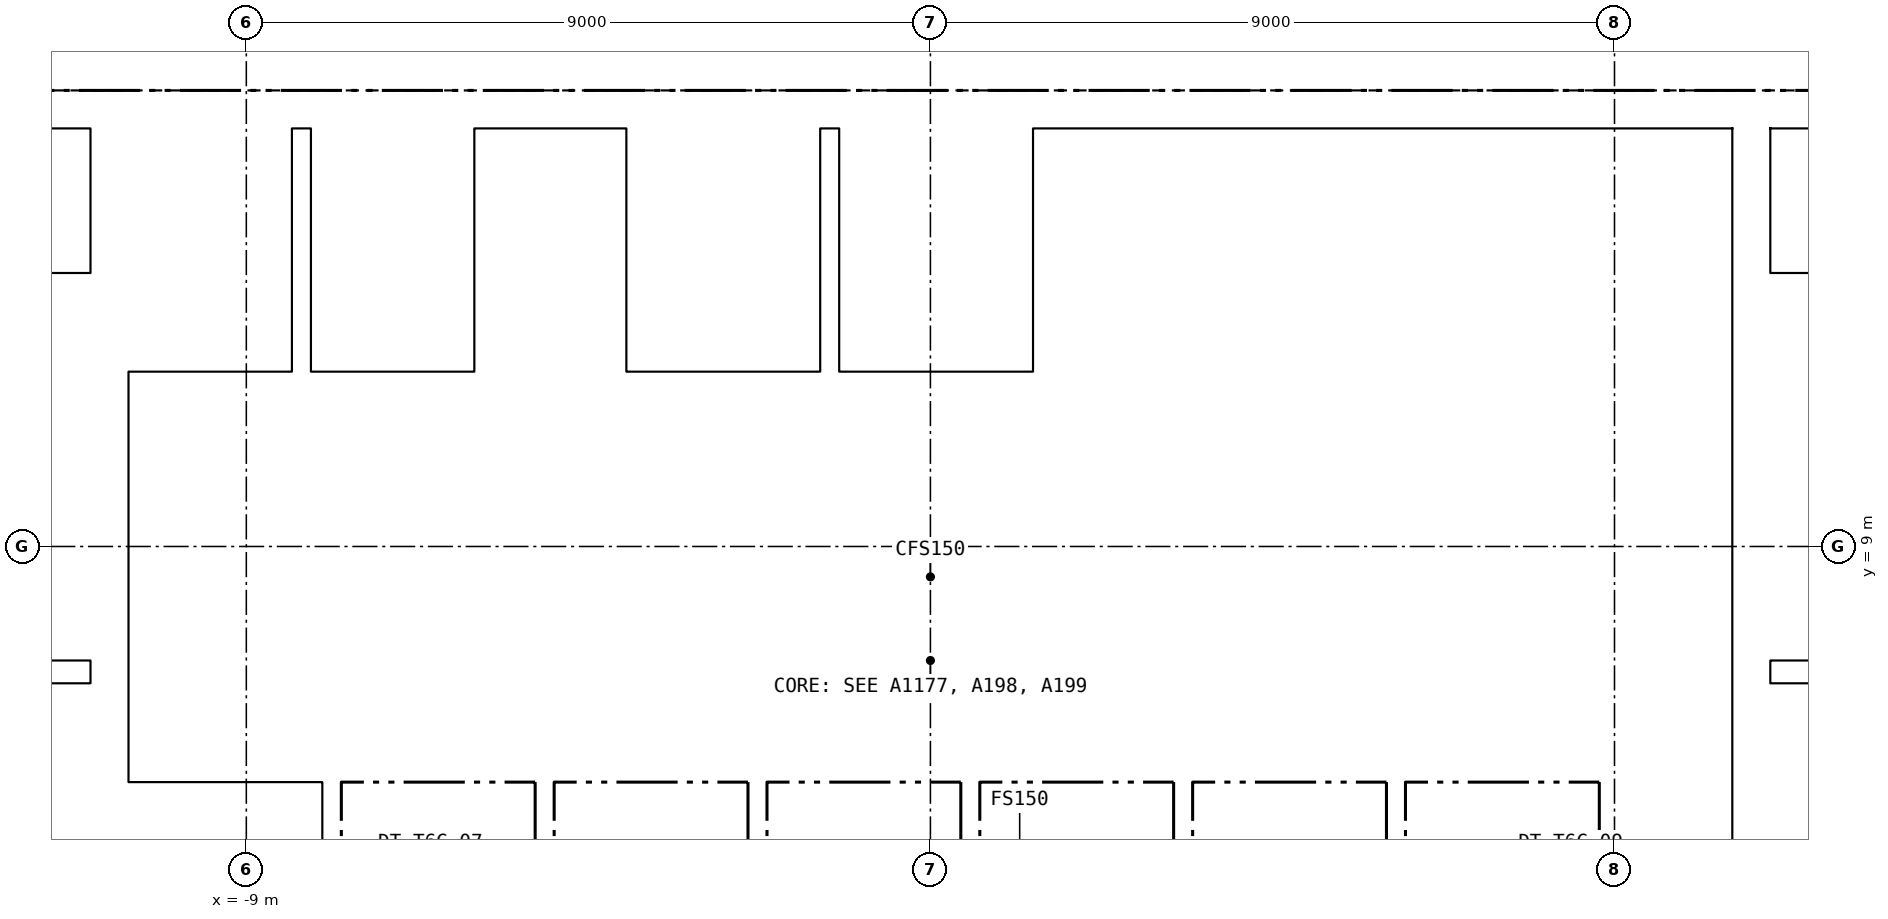
"""IFC4 building model, lengths in metres.
Left out: names, types, materials, properties, quantities, classifications, styles, units other than length and angle.
Written with IfcOpenShell. Run it as: python <this file> out.ifc"""

import sys

from ifc_helpers import new_model, si_unit, direction, frame, frame_2d, origin, place, context, subcontext, project, spatial, rectangle, extrude, element, fill, save


model = new_model("IFC4")
c1 = context("Model", 3, precision=1e-05, world=origin(), true_north=direction((0.0, 1.0)))
c2 = subcontext(c1, "Body", "Model", "MODEL_VIEW")
j1 = project(units=[si_unit("LENGTHUNIT", "METRE"), si_unit("PLANEANGLEUNIT", "RADIAN")], contexts=[c1])
p1 = place(None, origin())
s1 = spatial("IfcSite", under=j1, at=p1, CompositionType="ELEMENT")
p2 = place(p1, origin())
s2 = spatial("IfcBuilding", under=s1, at=p2, CompositionType="ELEMENT")
p3 = place(p2, frame((0.0, 0.0, 282.85)))
s3 = spatial("IfcBuildingStorey", under=s2, at=p3, CompositionType="ELEMENT", Elevation=282.85)
p4 = place(p3, frame((-15.0, 14.75, -0.15), z_axis=(0.0, 0.0, 1.0), x_axis=(1.0, 0.0, 0.0)))
e1 = element("IfcWall", 1, at=p4, inside=s3, PredefinedType="SOLIDWALL", context=c2, shape_type="SweptSolid", body=[
    extrude(rectangle(XDim=30.0, YDim=0.5, at=frame_2d((15.0, 0.0))), origin(), (0.0, 0.0, 1.0), 3.65),
])
p5 = place(p4, frame((9.25, 0.0, 0.15)))
e2 = element("IfcOpeningElement", 2, at=p5, cuts=e1, PredefinedType="OPENING", context=c2, shape_type="SweptSolid", body=[
    extrude(rectangle(XDim=1.5, YDim=2.1, at=frame_2d((0.75, 1.05))), frame((0.0, 0.26, 0.0), z_axis=(0.0, -1.0, 0.0), x_axis=(1.0, 0.0, 0.0)), (0.0, 0.0, 1.0), 0.52),
])
p6 = place(p4, frame((19.4, 0.0, 0.15)))
e3 = element("IfcOpeningElement", 3, at=p6, cuts=e1, PredefinedType="OPENING", context=c2, shape_type="SweptSolid", body=[
    extrude(rectangle(XDim=1.5, YDim=2.1, at=frame_2d((0.75, 1.05))), frame((0.0, 0.26, 0.0), z_axis=(0.0, -1.0, 0.0), x_axis=(1.0, 0.0, 0.0)), (0.0, 0.0, 1.0), 0.52),
])
p7 = place(p4, frame((1.5, 0.0, 0.15)))
e4 = element("IfcOpeningElement", 4, at=p7, cuts=e1, PredefinedType="OPENING", context=c2, shape_type="SweptSolid", body=[
    extrude(rectangle(XDim=1.2, YDim=2.1, at=frame_2d((0.6, 1.05))), frame((0.0, 0.26, 0.0), z_axis=(0.0, -1.0, 0.0), x_axis=(1.0, 0.0, 0.0)), (0.0, 0.0, 1.0), 0.52),
])
p8 = place(p4, frame((27.3, 0.0, 0.15)))
e5 = element("IfcOpeningElement", 5, at=p8, cuts=e1, PredefinedType="OPENING", context=c2, shape_type="SweptSolid", body=[
    extrude(rectangle(XDim=1.2, YDim=2.1, at=frame_2d((0.6, 1.05))), frame((0.0, 0.26, 0.0), z_axis=(0.0, -1.0, 0.0), x_axis=(1.0, 0.0, 0.0)), (0.0, 0.0, 1.0), 0.52),
])
for number, where, z_axis, x_axis in (
    (6, (-10.8, 0.5, -0.15), (0.0, 0.0, 1.0), (0.0, 1.0, 0.0)),
    (7, (10.8, 0.5, -0.15), (0.0, 0.0, 1.0), (0.0, 1.0, 0.0)),
):
    element("IfcWall", number, at=place(p3, frame(where, z_axis=z_axis, x_axis=x_axis)), inside=s3, PredefinedType="SOLIDWALL", context=c2, shape_type="SweptSolid", body=[
        extrude(rectangle(XDim=14.0, YDim=0.5, at=frame_2d((7.0, 0.0))), origin(), (0.0, 0.0, 1.0), 3.65),
    ])
p9 = place(p3, frame((-10.55, 6.025, 0.0), z_axis=(0.0, 0.0, 1.0), x_axis=(1.0, 0.0, 0.0)))
e8 = element("IfcWall", 8, at=p9, inside=s3, PredefinedType="PARTITIONING", context=c2, shape_type="SweptSolid", body=[
    extrude(rectangle(XDim=21.1, YDim=0.25, at=frame_2d((10.55, 0.0))), origin(), (0.0, 0.0, 1.0), 3.5),
])
p10 = place(p3, frame((-4.125, 8.55, 0.0), z_axis=(0.0, 0.0, 1.0), x_axis=(1.0, 0.0, 0.0)))
e9 = element("IfcWall", 9, at=p10, inside=s3, PredefinedType="PARTITIONING", context=c2, shape_type="SweptSolid", body=[
    extrude(rectangle(XDim=14.675, YDim=0.2, at=frame_2d((7.337, 0.0))), origin(), (0.0, 0.0, 1.0), 3.5),
])
p11 = place(p10, frame((1.413, 0.0, 0.0)))
e10 = element("IfcOpeningElement", 10, at=p11, cuts=e9, PredefinedType="OPENING", context=c2, shape_type="SweptSolid", body=[
    extrude(rectangle(XDim=1.0, YDim=2.1, at=frame_2d((0.5, 1.05))), frame((0.0, 0.11, 0.0), z_axis=(0.0, -1.0, 0.0), x_axis=(1.0, 0.0, 0.0)), (0.0, 0.0, 1.0), 0.22),
])
p12 = place(p10, frame((5.0, 0.0, 0.0)))
e11 = element("IfcOpeningElement", 11, at=p12, cuts=e9, PredefinedType="OPENING", context=c2, shape_type="SweptSolid", body=[
    extrude(rectangle(XDim=1.0, YDim=2.1, at=frame_2d((0.5, 1.05))), frame((0.0, 0.11, 0.0), z_axis=(0.0, -1.0, 0.0), x_axis=(1.0, 0.0, 0.0)), (0.0, 0.0, 1.0), 0.22),
])
p13 = place(p10, frame((9.613, 0.0, 0.0)))
e12 = element("IfcOpeningElement", 12, at=p13, cuts=e9, PredefinedType="OPENING", context=c2, shape_type="SweptSolid", body=[
    extrude(rectangle(XDim=1.0, YDim=2.1, at=frame_2d((0.5, 1.05))), frame((0.0, 0.11, 0.0), z_axis=(0.0, -1.0, 0.0), x_axis=(1.0, 0.0, 0.0)), (0.0, 0.0, 1.0), 0.22),
])
p14 = place(p10, frame((13.475, 0.0, 0.0)))
e13 = element("IfcOpeningElement", 13, at=p14, cuts=e9, PredefinedType="OPENING", context=c2, shape_type="SweptSolid", body=[
    extrude(rectangle(XDim=0.9, YDim=2.1, at=frame_2d((0.45, 1.05))), frame((0.0, 0.11, 0.0), z_axis=(0.0, -1.0, 0.0), x_axis=(1.0, 0.0, 0.0)), (0.0, 0.0, 1.0), 0.22),
])
p15 = place(p3, frame((-10.55, 11.2, 0.0), z_axis=(0.0, 0.0, 1.0), x_axis=(1.0, 0.0, 0.0)))
e14 = element("IfcWall", 14, at=p15, inside=s3, PredefinedType="PARTITIONING", context=c2, shape_type="SweptSolid", body=[
    extrude(rectangle(XDim=4.8, YDim=0.2, at=frame_2d((2.4, 0.0))), origin(), (0.0, 0.0, 1.0), 3.5),
])
p16 = place(p15, frame((0.525, 0.0, 0.0)))
e15 = element("IfcOpeningElement", 15, at=p16, cuts=e14, PredefinedType="OPENING", context=c2, shape_type="SweptSolid", body=[
    extrude(rectangle(XDim=1.1, YDim=2.1, at=frame_2d((0.55, 1.05))), frame((0.0, 0.11, 0.0), z_axis=(0.0, -1.0, 0.0), x_axis=(1.0, 0.0, 0.0)), (0.0, 0.0, 1.0), 0.22),
])
p17 = place(p15, frame((2.925, 0.0, 0.0)))
e16 = element("IfcOpeningElement", 16, at=p17, cuts=e14, PredefinedType="OPENING", context=c2, shape_type="SweptSolid", body=[
    extrude(rectangle(XDim=1.1, YDim=2.1, at=frame_2d((0.55, 1.05))), frame((0.0, 0.11, 0.0), z_axis=(0.0, -1.0, 0.0), x_axis=(1.0, 0.0, 0.0)), (0.0, 0.0, 1.0), 0.22),
])
p18 = place(p3, frame((-4.25, 11.2, 0.0), z_axis=(0.0, 0.0, 1.0), x_axis=(1.0, 0.0, 0.0)))
e17 = element("IfcWall", 17, at=p18, inside=s3, PredefinedType="PARTITIONING", context=c2, shape_type="SweptSolid", body=[
    extrude(rectangle(XDim=8.65, YDim=0.2, at=frame_2d((4.325, 0.0))), origin(), (0.0, 0.0, 1.0), 3.5),
])
p19 = place(p18, frame((0.825, 0.0, 0.0)))
e18 = element("IfcOpeningElement", 18, at=p19, cuts=e17, PredefinedType="OPENING", context=c2, shape_type="SweptSolid", body=[
    extrude(rectangle(XDim=1.4, YDim=2.1, at=frame_2d((0.7, 1.05))), frame((0.0, 0.11, 0.0), z_axis=(0.0, -1.0, 0.0), x_axis=(1.0, 0.0, 0.0)), (0.0, 0.0, 1.0), 0.22),
])
p20 = place(p18, frame((3.625, 0.0, 0.0)))
e19 = element("IfcOpeningElement", 19, at=p20, cuts=e17, PredefinedType="OPENING", context=c2, shape_type="SweptSolid", body=[
    extrude(rectangle(XDim=1.4, YDim=2.1, at=frame_2d((0.7, 1.05))), frame((0.0, 0.11, 0.0), z_axis=(0.0, -1.0, 0.0), x_axis=(1.0, 0.0, 0.0)), (0.0, 0.0, 1.0), 0.22),
])
p21 = place(p18, frame((6.675, 0.0, 0.0)))
e20 = element("IfcOpeningElement", 20, at=p21, cuts=e17, PredefinedType="OPENING", context=c2, shape_type="SweptSolid", body=[
    extrude(rectangle(XDim=0.9, YDim=2.1, at=frame_2d((0.45, 1.05))), frame((0.0, 0.11, 0.0), z_axis=(0.0, -1.0, 0.0), x_axis=(1.0, 0.0, 0.0)), (0.0, 0.0, 1.0), 0.22),
])
p22 = place(p3, frame((5.9, 11.2, 0.0), z_axis=(0.0, 0.0, 1.0), x_axis=(1.0, 0.0, 0.0)))
e21 = element("IfcWall", 21, at=p22, inside=s3, PredefinedType="PARTITIONING", context=c2, shape_type="SweptSolid", body=[
    extrude(rectangle(XDim=4.65, YDim=0.2, at=frame_2d((2.325, 0.0))), origin(), (0.0, 0.0, 1.0), 3.5),
])
p23 = place(p22, frame((1.025, 0.0, 0.0)))
e22 = element("IfcOpeningElement", 22, at=p23, cuts=e21, PredefinedType="OPENING", context=c2, shape_type="SweptSolid", body=[
    extrude(rectangle(XDim=1.0, YDim=2.1, at=frame_2d((0.5, 1.05))), frame((0.0, 0.11, 0.0), z_axis=(0.0, -1.0, 0.0), x_axis=(1.0, 0.0, 0.0)), (0.0, 0.0, 1.0), 0.22),
])
p24 = place(p22, frame((3.4, 0.0, 0.0)))
e23 = element("IfcOpeningElement", 23, at=p24, cuts=e21, PredefinedType="OPENING", context=c2, shape_type="SweptSolid", body=[
    extrude(rectangle(XDim=0.9, YDim=2.1, at=frame_2d((0.45, 1.05))), frame((0.0, 0.11, 0.0), z_axis=(0.0, -1.0, 0.0), x_axis=(1.0, 0.0, 0.0)), (0.0, 0.0, 1.0), 0.22),
])
p25 = place(p3, frame((-4.125, 6.15, 0.0), z_axis=(0.0, 0.0, 1.0), x_axis=(0.0, 1.0, 0.0)))
e24 = element("IfcWall", 24, at=p25, inside=s3, PredefinedType="PARTITIONING", context=c2, shape_type="SweptSolid", body=[
    extrude(rectangle(XDim=4.95, YDim=0.25, at=frame_2d((2.475, 0.0))), origin(), (0.0, 0.0, 1.0), 3.5),
])
p26 = place(p25, frame((3.125, 0.0, 0.0)))
e25 = element("IfcOpeningElement", 25, at=p26, cuts=e24, PredefinedType="OPENING", context=c2, shape_type="SweptSolid", body=[
    extrude(rectangle(XDim=1.2, YDim=2.1, at=frame_2d((0.6, 1.05))), frame((0.0, 0.135, 0.0), z_axis=(0.0, -1.0, 0.0), x_axis=(1.0, 0.0, 0.0)), (0.0, 0.0, 1.0), 0.27),
])
for number, where, z_axis, x_axis in (
    (26, (-7.875, 3.6, 0.0), (0.0, 0.0, 1.0), (0.0, 1.0, 0.0)),
    (27, (-5.075, 3.6, 0.0), (0.0, 0.0, 1.0), (0.0, 1.0, 0.0)),
    (28, (-2.275, 3.6, 0.0), (0.0, 0.0, 1.0), (0.0, 1.0, 0.0)),
    (29, (0.525, 3.6, 0.0), (0.0, 0.0, 1.0), (0.0, 1.0, 0.0)),
    (30, (3.325, 3.6, 0.0), (0.0, 0.0, 1.0), (0.0, 1.0, 0.0)),
    (31, (6.125, 3.6, 0.0), (0.0, 0.0, 1.0), (0.0, 1.0, 0.0)),
    (32, (8.925, 3.6, 0.0), (0.0, 0.0, 1.0), (0.0, 1.0, 0.0)),
):
    element("IfcWall", number, at=place(p3, frame(where, z_axis=z_axis, x_axis=x_axis)), inside=s3, PredefinedType="PARTITIONING", context=c2, shape_type="SweptSolid", body=[
        extrude(rectangle(XDim=2.3, YDim=0.25, at=frame_2d((1.15, 0.0))), origin(), (0.0, 0.0, 1.0), 3.5),
    ])
for number, where, z_axis, x_axis in (
    (33, (-0.35, 6.15, 0.0), (0.0, 0.0, 1.0), (0.0, 1.0, 0.0)),
    (34, (3.1, 6.15, 0.0), (0.0, 0.0, 1.0), (0.0, 1.0, 0.0)),
):
    element("IfcWall", number, at=place(p3, frame(where, z_axis=z_axis, x_axis=x_axis)), inside=s3, PredefinedType="PARTITIONING", context=c2, shape_type="SweptSolid", body=[
        extrude(rectangle(XDim=2.3, YDim=0.15, at=frame_2d((1.15, 0.0))), origin(), (0.0, 0.0, 1.0), 3.5),
    ])
p27 = place(p3, frame((8.925, 6.15, 0.0), z_axis=(0.0, 0.0, 1.0), x_axis=(0.0, 1.0, 0.0)))
e35 = element("IfcWall", 35, at=p27, inside=s3, PredefinedType="PARTITIONING", context=c2, shape_type="SweptSolid", body=[
    extrude(rectangle(XDim=2.3, YDim=0.25, at=frame_2d((1.15, 0.0))), origin(), (0.0, 0.0, 1.0), 3.5),
])
for number, where, z_axis, x_axis in (
    (36, (-8.275, 11.3, 0.0), (0.0, 0.0, 1.0), (0.0, 1.0, 0.0)),
    (37, (-5.875, 11.3, 0.0), (0.0, 0.0, 1.0), (0.0, 1.0, 0.0)),
    (38, (-4.125, 11.3, 0.0), (0.0, 0.0, 1.0), (0.0, 1.0, 0.0)),
    (39, (-1.325, 11.3, 0.0), (0.0, 0.0, 1.0), (0.0, 1.0, 0.0)),
    (40, (1.475, 11.3, 0.0), (0.0, 0.0, 1.0), (0.0, 1.0, 0.0)),
    (41, (4.275, 11.3, 0.0), (0.0, 0.0, 1.0), (0.0, 1.0, 0.0)),
    (42, (6.025, 11.3, 0.0), (0.0, 0.0, 1.0), (0.0, 1.0, 0.0)),
    (43, (8.825, 11.3, 0.0), (0.0, 0.0, 1.0), (0.0, 1.0, 0.0)),
):
    element("IfcWall", number, at=place(p3, frame(where, z_axis=z_axis, x_axis=x_axis)), inside=s3, PredefinedType="PARTITIONING", context=c2, shape_type="SweptSolid", body=[
        extrude(rectangle(XDim=3.2, YDim=0.25, at=frame_2d((1.6, 0.0))), origin(), (0.0, 0.0, 1.0), 3.5),
    ])
for number, where, z_axis, x_axis in (
    (44, (-14.0, 7.35, 0.0), (0.0, 0.0, 1.0), (1.0, 0.0, 0.0)),
    (45, (11.05, 7.35, 0.0), (0.0, 0.0, 1.0), (1.0, 0.0, 0.0)),
):
    element("IfcWall", number, at=place(p3, frame(where, z_axis=z_axis, x_axis=x_axis)), inside=s3, PredefinedType="SOLIDWALL", context=c2, shape_type="SweptSolid", body=[
        extrude(rectangle(XDim=2.95, YDim=0.3, at=frame_2d((1.475, 0.0))), origin(), (0.0, 0.0, 1.0), 3.5),
    ])
p28 = place(p26, origin())
e46 = element("IfcDoor", 46, at=p28, inside=s3, OperationType="SINGLE_SWING_LEFT", PredefinedType="DOOR", context=c2, shape_type="SweptSolid", body=[
    extrude(rectangle(XDim=1.2, YDim=2.1, at=frame_2d((0.6, 1.05))), frame((0.0, 0.025, 0.0), z_axis=(0.0, -1.0, 0.0), x_axis=(1.0, 0.0, 0.0)), (0.0, 0.0, 1.0), 0.05),
])
fill(e25, e46)
p29 = place(p11, origin())
e47 = element("IfcDoor", 47, at=p29, inside=s3, OperationType="SINGLE_SWING_LEFT", PredefinedType="DOOR", context=c2, shape_type="SweptSolid", body=[
    extrude(rectangle(XDim=1.0, YDim=2.1, at=frame_2d((0.5, 1.05))), frame((0.0, 0.025, 0.0), z_axis=(0.0, -1.0, 0.0), x_axis=(1.0, 0.0, 0.0)), (0.0, 0.0, 1.0), 0.05),
])
fill(e10, e47)
p30 = place(p12, origin())
e48 = element("IfcDoor", 48, at=p30, inside=s3, OperationType="SINGLE_SWING_RIGHT", PredefinedType="DOOR", context=c2, shape_type="SweptSolid", body=[
    extrude(rectangle(XDim=1.0, YDim=2.1, at=frame_2d((0.5, 1.05))), frame((0.0, 0.025, 0.0), z_axis=(0.0, -1.0, 0.0), x_axis=(1.0, 0.0, 0.0)), (0.0, 0.0, 1.0), 0.05),
])
fill(e11, e48)
p31 = place(p13, origin())
e49 = element("IfcDoor", 49, at=p31, inside=s3, OperationType="SINGLE_SWING_LEFT", PredefinedType="DOOR", context=c2, shape_type="SweptSolid", body=[
    extrude(rectangle(XDim=1.0, YDim=2.1, at=frame_2d((0.5, 1.05))), frame((0.0, 0.025, 0.0), z_axis=(0.0, -1.0, 0.0), x_axis=(1.0, 0.0, 0.0)), (0.0, 0.0, 1.0), 0.05),
])
fill(e12, e49)
p32 = place(p14, origin())
e50 = element("IfcDoor", 50, at=p32, inside=s3, OperationType="SINGLE_SWING_RIGHT", PredefinedType="DOOR", context=c2, shape_type="SweptSolid", body=[
    extrude(rectangle(XDim=0.9, YDim=2.1, at=frame_2d((0.45, 1.05))), frame((0.0, 0.025, 0.0), z_axis=(0.0, -1.0, 0.0), x_axis=(1.0, 0.0, 0.0)), (0.0, 0.0, 1.0), 0.05),
])
fill(e13, e50)
p33 = place(p16, origin())
e51 = element("IfcDoor", 51, at=p33, inside=s3, OperationType="DOUBLE_DOOR_SLIDING", PredefinedType="DOOR", context=c2, shape_type="SweptSolid", body=[
    extrude(rectangle(XDim=1.1, YDim=2.1, at=frame_2d((0.55, 1.05))), frame((0.0, 0.025, 0.0), z_axis=(0.0, -1.0, 0.0), x_axis=(1.0, 0.0, 0.0)), (0.0, 0.0, 1.0), 0.05),
])
fill(e15, e51)
p34 = place(p17, origin())
e52 = element("IfcDoor", 52, at=p34, inside=s3, OperationType="DOUBLE_DOOR_SLIDING", PredefinedType="DOOR", context=c2, shape_type="SweptSolid", body=[
    extrude(rectangle(XDim=1.1, YDim=2.1, at=frame_2d((0.55, 1.05))), frame((0.0, 0.025, 0.0), z_axis=(0.0, -1.0, 0.0), x_axis=(1.0, 0.0, 0.0)), (0.0, 0.0, 1.0), 0.05),
])
fill(e16, e52)
p35 = place(p19, origin())
e53 = element("IfcDoor", 53, at=p35, inside=s3, OperationType="DOUBLE_DOOR_SLIDING", PredefinedType="DOOR", context=c2, shape_type="SweptSolid", body=[
    extrude(rectangle(XDim=1.4, YDim=2.1, at=frame_2d((0.7, 1.05))), frame((0.0, 0.025, 0.0), z_axis=(0.0, -1.0, 0.0), x_axis=(1.0, 0.0, 0.0)), (0.0, 0.0, 1.0), 0.05),
])
fill(e18, e53)
p36 = place(p20, origin())
e54 = element("IfcDoor", 54, at=p36, inside=s3, OperationType="DOUBLE_DOOR_SLIDING", PredefinedType="DOOR", context=c2, shape_type="SweptSolid", body=[
    extrude(rectangle(XDim=1.4, YDim=2.1, at=frame_2d((0.7, 1.05))), frame((0.0, 0.025, 0.0), z_axis=(0.0, -1.0, 0.0), x_axis=(1.0, 0.0, 0.0)), (0.0, 0.0, 1.0), 0.05),
])
fill(e19, e54)
p37 = place(p21, origin())
e55 = element("IfcDoor", 55, at=p37, inside=s3, OperationType="SINGLE_SWING_LEFT", PredefinedType="DOOR", context=c2, shape_type="SweptSolid", body=[
    extrude(rectangle(XDim=0.9, YDim=2.1, at=frame_2d((0.45, 1.05))), frame((0.0, 0.025, 0.0), z_axis=(0.0, -1.0, 0.0), x_axis=(1.0, 0.0, 0.0)), (0.0, 0.0, 1.0), 0.05),
])
fill(e20, e55)
p38 = place(p23, origin())
e56 = element("IfcDoor", 56, at=p38, inside=s3, OperationType="SINGLE_SWING_RIGHT", PredefinedType="DOOR", context=c2, shape_type="SweptSolid", body=[
    extrude(rectangle(XDim=1.0, YDim=2.1, at=frame_2d((0.5, 1.05))), frame((0.0, 0.025, 0.0), z_axis=(0.0, -1.0, 0.0), x_axis=(1.0, 0.0, 0.0)), (0.0, 0.0, 1.0), 0.05),
])
fill(e22, e56)
p39 = place(p24, origin())
e57 = element("IfcDoor", 57, at=p39, inside=s3, OperationType="SINGLE_SWING_LEFT", PredefinedType="DOOR", context=c2, shape_type="SweptSolid", body=[
    extrude(rectangle(XDim=0.9, YDim=2.1, at=frame_2d((0.45, 1.05))), frame((0.0, 0.025, 0.0), z_axis=(0.0, -1.0, 0.0), x_axis=(1.0, 0.0, 0.0)), (0.0, 0.0, 1.0), 0.05),
])
fill(e23, e57)
p40 = place(p5, origin())
e58 = element("IfcDoor", 58, at=p40, inside=s3, OperationType="DOUBLE_DOOR_SINGLE_SWING", PredefinedType="DOOR", context=c2, shape_type="SweptSolid", body=[
    extrude(rectangle(XDim=1.5, YDim=2.1, at=frame_2d((0.75, 1.05))), frame((0.0, 0.025, 0.0), z_axis=(0.0, -1.0, 0.0), x_axis=(1.0, 0.0, 0.0)), (0.0, 0.0, 1.0), 0.05),
])
fill(e2, e58)
p41 = place(p6, origin())
e59 = element("IfcDoor", 59, at=p41, inside=s3, OperationType="DOUBLE_DOOR_SINGLE_SWING", PredefinedType="DOOR", context=c2, shape_type="SweptSolid", body=[
    extrude(rectangle(XDim=1.5, YDim=2.1, at=frame_2d((0.75, 1.05))), frame((0.0, 0.025, 0.0), z_axis=(0.0, -1.0, 0.0), x_axis=(1.0, 0.0, 0.0)), (0.0, 0.0, 1.0), 0.05),
])
fill(e3, e59)
save(model, sys.argv[1])
